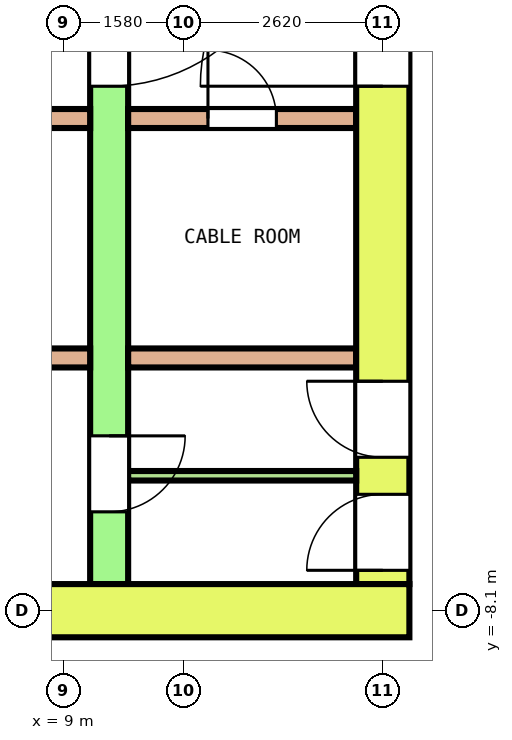
"""IFC4 building model, lengths in metres.
Left out: names, types, materials, properties, quantities, classifications, styles, units other than length and angle.
Written with IfcOpenShell. Run it as: python <this file> out.ifc"""

import sys

from ifc_helpers import new_model, si_unit, direction, frame, frame_2d, origin, place, context, subcontext, project, spatial, rectangle, extrude, element, fill, save


model = new_model("IFC4")
c1 = context("Model", 3, precision=1e-05, world=origin(), true_north=direction((0.0, 1.0)))
c2 = subcontext(c1, "Body", "Model", "MODEL_VIEW")
j1 = project(units=[si_unit("LENGTHUNIT", "METRE"), si_unit("PLANEANGLEUNIT", "RADIAN")], contexts=[c1])
p1 = place(None, origin())
s1 = spatial("IfcSite", under=j1, at=p1, CompositionType="ELEMENT")
p2 = place(p1, origin())
s2 = spatial("IfcBuilding", under=s1, at=p2, CompositionType="ELEMENT")
p3 = place(p2, frame((0.0, 0.0, 145.2)))
s3 = spatial("IfcBuildingStorey", under=s2, at=p3, CompositionType="ELEMENT", Elevation=145.2)
p4 = place(p3, frame((-13.55, -8.1, 0.0), z_axis=(0.0, 0.0, 1.0), x_axis=(1.0, 0.0, 0.0)))
e1 = element("IfcWall", 1, at=p4, inside=s3, PredefinedType="SHEAR", context=c2, shape_type="SweptSolid", body=[
    extrude(rectangle(XDim=27.1, YDim=0.7, at=frame_2d((13.55, 0.0))), origin(), (0.0, 0.0, 1.0), 4.1),
])
p5 = place(p4, frame((15.1, 0.0, 0.0)))
e2 = element("IfcOpeningElement", 2, at=p5, cuts=e1, PredefinedType="OPENING", context=c2, shape_type="SweptSolid", body=[
    extrude(rectangle(XDim=1.2, YDim=2.1, at=frame_2d((0.6, 1.05))), frame((0.0, 0.36, 0.0), z_axis=(0.0, -1.0, 0.0), x_axis=(1.0, 0.0, 0.0)), (0.0, 0.0, 1.0), 0.72),
])
p6 = place(p3, frame((13.2, -7.75, 0.0), z_axis=(0.0, 0.0, 1.0), x_axis=(0.0, 1.0, 0.0)))
e3 = element("IfcWall", 3, at=p6, inside=s3, PredefinedType="SHEAR", context=c2, shape_type="SweptSolid", body=[
    extrude(rectangle(XDim=15.5, YDim=0.7, at=frame_2d((7.75, 0.0))), origin(), (0.0, 0.0, 1.0), 4.1),
])
p7 = place(p6, frame((6.55, 0.0, 0.0)))
e4 = element("IfcOpeningElement", 4, at=p7, cuts=e3, PredefinedType="OPENING", context=c2, shape_type="SweptSolid", body=[
    extrude(rectangle(XDim=2.4, YDim=2.1, at=frame_2d((1.2, 1.05))), frame((0.0, 0.36, 0.0), z_axis=(0.0, -1.0, 0.0), x_axis=(1.0, 0.0, 0.0)), (0.0, 0.0, 1.0), 0.72),
])
p8 = place(p6, frame((13.45, 0.0, 0.0)))
e5 = element("IfcOpeningElement", 5, at=p8, cuts=e3, PredefinedType="OPENING", context=c2, shape_type="SweptSolid", body=[
    extrude(rectangle(XDim=1.2, YDim=2.1, at=frame_2d((0.6, 1.05))), frame((0.0, 0.36, 0.0), z_axis=(0.0, -1.0, 0.0), x_axis=(1.0, 0.0, 0.0)), (0.0, 0.0, 1.0), 0.72),
])
p9 = place(p6, frame((0.181, 0.0, 0.0)))
e6 = element("IfcOpeningElement", 6, at=p9, cuts=e3, PredefinedType="OPENING", context=c2, shape_type="SweptSolid", body=[
    extrude(rectangle(XDim=1.0, YDim=2.1, at=frame_2d((0.5, 1.05))), frame((0.0, 0.36, 0.0), z_axis=(0.0, -1.0, 0.0), x_axis=(1.0, 0.0, 0.0)), (0.0, 0.0, 1.0), 0.72),
])
p10 = place(p6, frame((1.669, 0.0, 0.0)))
e7 = element("IfcOpeningElement", 7, at=p10, cuts=e3, PredefinedType="OPENING", context=c2, shape_type="SweptSolid", body=[
    extrude(rectangle(XDim=1.0, YDim=2.1, at=frame_2d((0.5, 1.05))), frame((0.0, 0.36, 0.0), z_axis=(0.0, -1.0, 0.0), x_axis=(1.0, 0.0, 0.0)), (0.0, 0.0, 1.0), 0.72),
])
p11 = place(p3, frame((9.6, -7.75, 0.0), z_axis=(0.0, 0.0, 1.0), x_axis=(0.0, 1.0, 0.0)))
e8 = element("IfcWall", 8, at=p11, inside=s3, PredefinedType="SHEAR", context=c2, shape_type="SweptSolid", body=[
    extrude(rectangle(XDim=15.5, YDim=0.5, at=frame_2d((7.75, 0.0))), origin(), (0.0, 0.0, 1.0), 4.1),
])
p12 = place(p11, frame((6.55, 0.0, 0.0)))
e9 = element("IfcOpeningElement", 9, at=p12, cuts=e8, PredefinedType="OPENING", context=c2, shape_type="SweptSolid", body=[
    extrude(rectangle(XDim=2.4, YDim=2.1, at=frame_2d((1.2, 1.05))), frame((0.0, 0.26, 0.0), z_axis=(0.0, -1.0, 0.0), x_axis=(1.0, 0.0, 0.0)), (0.0, 0.0, 1.0), 0.52),
])
p13 = place(p11, frame((13.45, 0.0, 0.0)))
e10 = element("IfcOpeningElement", 10, at=p13, cuts=e8, PredefinedType="OPENING", context=c2, shape_type="SweptSolid", body=[
    extrude(rectangle(XDim=1.2, YDim=2.1, at=frame_2d((0.6, 1.05))), frame((0.0, 0.26, 0.0), z_axis=(0.0, -1.0, 0.0), x_axis=(1.0, 0.0, 0.0)), (0.0, 0.0, 1.0), 0.52),
])
p14 = place(p11, frame((0.95, 0.0, 0.0)))
e11 = element("IfcOpeningElement", 11, at=p14, cuts=e8, PredefinedType="OPENING", context=c2, shape_type="SweptSolid", body=[
    extrude(rectangle(XDim=1.0, YDim=2.1, at=frame_2d((0.5, 1.05))), frame((0.0, 0.26, 0.0), z_axis=(0.0, -1.0, 0.0), x_axis=(1.0, 0.0, 0.0)), (0.0, 0.0, 1.0), 0.52),
])
p15 = place(p3, frame((-9.35, -1.625, 0.0), z_axis=(0.0, 0.0, 1.0), x_axis=(1.0, 0.0, 0.0)))
e12 = element("IfcWall", 12, at=p15, inside=s3, PredefinedType="SOLIDWALL", context=c2, shape_type="SweptSolid", body=[
    extrude(rectangle(XDim=18.7, YDim=0.25, at=frame_2d((9.35, 0.0))), origin(), (0.0, 0.0, 1.0), 4.1),
])
p16 = place(p15, frame((2.85, 0.0, 0.0)))
e13 = element("IfcOpeningElement", 13, at=p16, cuts=e12, PredefinedType="OPENING", context=c2, shape_type="SweptSolid", body=[
    extrude(rectangle(XDim=1.1, YDim=2.1, at=frame_2d((0.55, 1.05))), frame((0.0, 0.135, 0.0), z_axis=(0.0, -1.0, 0.0), x_axis=(1.0, 0.0, 0.0)), (0.0, 0.0, 1.0), 0.27),
])
p17 = place(p15, frame((5.15, 0.0, 0.0)))
e14 = element("IfcOpeningElement", 14, at=p17, cuts=e12, PredefinedType="OPENING", context=c2, shape_type="SweptSolid", body=[
    extrude(rectangle(XDim=1.1, YDim=2.1, at=frame_2d((0.55, 1.05))), frame((0.0, 0.135, 0.0), z_axis=(0.0, -1.0, 0.0), x_axis=(1.0, 0.0, 0.0)), (0.0, 0.0, 1.0), 0.27),
])
p18 = place(p15, frame((14.8, 0.0, 0.0)))
e15 = element("IfcOpeningElement", 15, at=p18, cuts=e12, PredefinedType="OPENING", context=c2, shape_type="SweptSolid", body=[
    extrude(rectangle(XDim=1.1, YDim=2.1, at=frame_2d((0.55, 1.05))), frame((0.0, 0.135, 0.0), z_axis=(0.0, -1.0, 0.0), x_axis=(1.0, 0.0, 0.0)), (0.0, 0.0, 1.0), 0.27),
])
p19 = place(p15, frame((0.575, 0.0, 0.0)))
e16 = element("IfcOpeningElement", 16, at=p19, cuts=e12, PredefinedType="OPENING", context=c2, shape_type="SweptSolid", body=[
    extrude(rectangle(XDim=0.9, YDim=2.1, at=frame_2d((0.45, 1.05))), frame((0.0, 0.135, 0.0), z_axis=(0.0, -1.0, 0.0), x_axis=(1.0, 0.0, 0.0)), (0.0, 0.0, 1.0), 0.27),
])
p20 = place(p15, frame((17.225, 0.0, 0.0)))
e17 = element("IfcOpeningElement", 17, at=p20, cuts=e12, PredefinedType="OPENING", context=c2, shape_type="SweptSolid", body=[
    extrude(rectangle(XDim=0.9, YDim=2.1, at=frame_2d((0.45, 1.05))), frame((0.0, 0.135, 0.0), z_axis=(0.0, -1.0, 0.0), x_axis=(1.0, 0.0, 0.0)), (0.0, 0.0, 1.0), 0.27),
])
p21 = place(p3, frame((9.85, -1.625, 0.0), z_axis=(0.0, 0.0, 1.0), x_axis=(1.0, 0.0, 0.0)))
e18 = element("IfcWall", 18, at=p21, inside=s3, PredefinedType="SOLIDWALL", context=c2, shape_type="SweptSolid", body=[
    extrude(rectangle(XDim=3.0, YDim=0.25, at=frame_2d((1.5, 0.0))), origin(), (0.0, 0.0, 1.0), 4.1),
])
p22 = place(p21, frame((1.05, 0.0, 0.0)))
e19 = element("IfcOpeningElement", 19, at=p22, cuts=e18, PredefinedType="OPENING", context=c2, shape_type="SweptSolid", body=[
    extrude(rectangle(XDim=0.9, YDim=2.1, at=frame_2d((0.45, 1.05))), frame((0.0, 0.135, 0.0), z_axis=(0.0, -1.0, 0.0), x_axis=(1.0, 0.0, 0.0)), (0.0, 0.0, 1.0), 0.27),
])
p23 = place(p3, frame((-9.35, -4.775, 0.0), z_axis=(0.0, 0.0, 1.0), x_axis=(1.0, 0.0, 0.0)))
e20 = element("IfcWall", 20, at=p23, inside=s3, PredefinedType="SOLIDWALL", context=c2, shape_type="SweptSolid", body=[
    extrude(rectangle(XDim=18.7, YDim=0.25, at=frame_2d((9.35, 0.0))), origin(), (0.0, 0.0, 1.0), 4.1),
])
p24 = place(p3, frame((9.85, -4.775, 0.0), z_axis=(0.0, 0.0, 1.0), x_axis=(1.0, 0.0, 0.0)))
e21 = element("IfcWall", 21, at=p24, inside=s3, PredefinedType="SOLIDWALL", context=c2, shape_type="SweptSolid", body=[
    extrude(rectangle(XDim=3.0, YDim=0.25, at=frame_2d((1.5, 0.0))), origin(), (0.0, 0.0, 1.0), 4.1),
])
p25 = place(p3, frame((9.85, -6.325, 0.0), z_axis=(0.0, 0.0, 1.0), x_axis=(1.0, 0.0, 0.0)))
e22 = element("IfcWall", 22, at=p25, inside=s3, PredefinedType="PARTITIONING", context=c2, shape_type="SweptSolid", body=[
    extrude(rectangle(XDim=3.0, YDim=0.125, at=frame_2d((1.5, 0.0))), origin(), (0.0, 0.0, 1.0), 4.1),
])
p26 = place(p12, origin())
e23 = element("IfcDoor", 23, at=p26, inside=s3, OperationType="DOUBLE_DOOR_SINGLE_SWING", PredefinedType="DOOR", context=c2, shape_type="SweptSolid", body=[
    extrude(rectangle(XDim=2.4, YDim=2.1, at=frame_2d((1.2, 1.05))), frame((0.0, 0.2, 0.0), z_axis=(0.0, -1.0, 0.0), x_axis=(1.0, 0.0, 0.0)), (0.0, 0.0, 1.0), 0.4),
])
fill(e9, e23)
p27 = place(p7, origin())
e24 = element("IfcDoor", 24, at=p27, inside=s3, OperationType="DOUBLE_DOOR_SINGLE_SWING", PredefinedType="DOOR", context=c2, shape_type="SweptSolid", body=[
    extrude(rectangle(XDim=2.4, YDim=2.1, at=frame_2d((1.2, 1.05))), frame((0.0, 0.3, 0.0), z_axis=(0.0, -1.0, 0.0), x_axis=(1.0, 0.0, 0.0)), (0.0, 0.0, 1.0), 0.6),
])
fill(e4, e24)
p28 = place(p14, origin())
e25 = element("IfcDoor", 25, at=p28, inside=s3, OperationType="SINGLE_SWING_RIGHT", PredefinedType="DOOR", context=c2, shape_type="SweptSolid", body=[
    extrude(rectangle(XDim=1.0, YDim=2.1, at=frame_2d((0.5, 1.05))), frame((0.0, 0.2, 0.0), z_axis=(0.0, -1.0, 0.0), x_axis=(1.0, 0.0, 0.0)), (0.0, 0.0, 1.0), 0.4),
])
fill(e11, e25)
p29 = place(p9, origin())
e26 = element("IfcDoor", 26, at=p29, inside=s3, OperationType="SINGLE_SWING_LEFT", PredefinedType="DOOR", context=c2, shape_type="SweptSolid", body=[
    extrude(rectangle(XDim=1.0, YDim=2.1, at=frame_2d((0.5, 1.05))), frame((0.0, 0.3, 0.0), z_axis=(0.0, -1.0, 0.0), x_axis=(1.0, 0.0, 0.0)), (0.0, 0.0, 1.0), 0.6),
])
fill(e6, e26)
p30 = place(p10, origin())
e27 = element("IfcDoor", 27, at=p30, inside=s3, OperationType="SINGLE_SWING_RIGHT", PredefinedType="DOOR", context=c2, shape_type="SweptSolid", body=[
    extrude(rectangle(XDim=1.0, YDim=2.1, at=frame_2d((0.5, 1.05))), frame((0.0, 0.3, 0.0), z_axis=(0.0, -1.0, 0.0), x_axis=(1.0, 0.0, 0.0)), (0.0, 0.0, 1.0), 0.6),
])
fill(e7, e27)
p31 = place(p22, origin())
e28 = element("IfcDoor", 28, at=p31, inside=s3, OperationType="SINGLE_SWING_RIGHT", PredefinedType="DOOR", context=c2, shape_type="SweptSolid", body=[
    extrude(rectangle(XDim=0.9, YDim=2.1, at=frame_2d((0.45, 1.05))), frame((0.0, 0.075, 0.0), z_axis=(0.0, -1.0, 0.0), x_axis=(1.0, 0.0, 0.0)), (0.0, 0.0, 1.0), 0.15),
])
fill(e19, e28)
save(model, sys.argv[1])
